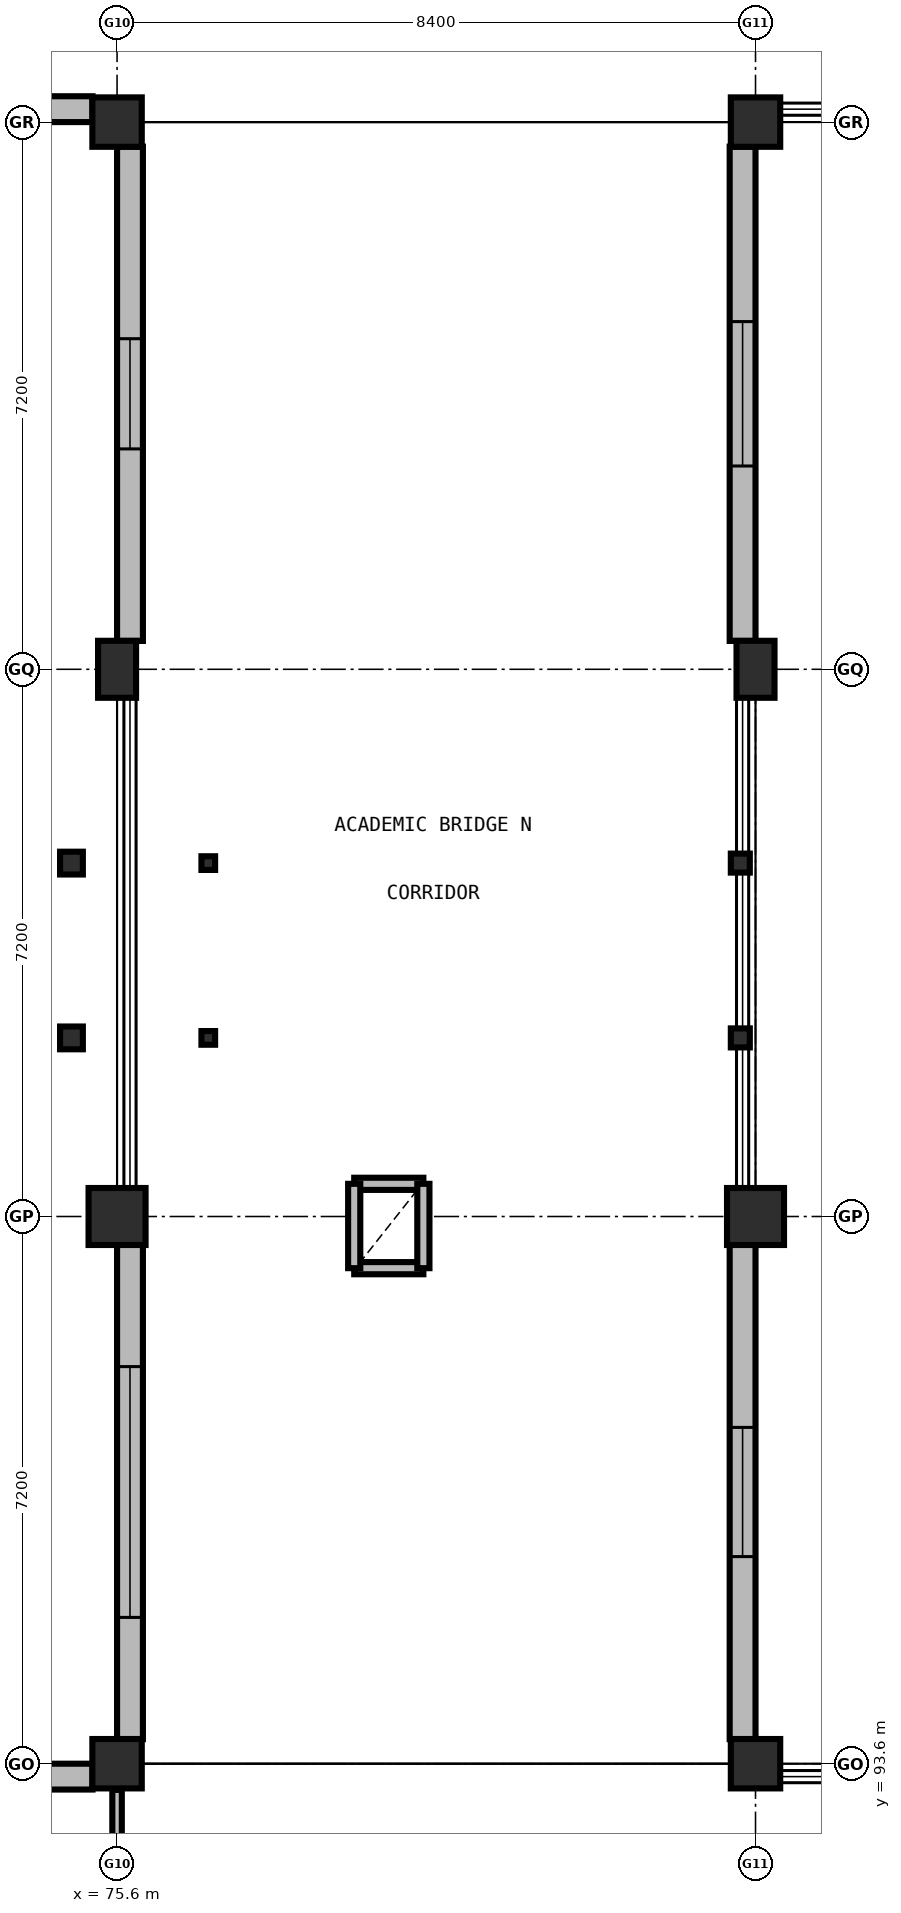
"""IFC4 building model, lengths in metres.
Left out: names, types, materials, properties, quantities, classifications, styles, units other than length and angle.
Written with IfcOpenShell. Run it as: python <this file> out.ifc"""

import sys

from ifc_helpers import new_model, si_unit, direction, frame, frame_2d, origin, origin_2d, place, context, subcontext, project, spatial, rectangle, hollow_rectangle, i_section, extrude, element, fill, save


model = new_model("IFC4")
c1 = context("Model", 3, precision=1e-05, world=origin(), true_north=direction((0.0, 1.0)))
c2 = subcontext(c1, "Body", "Model", "MODEL_VIEW")
j1 = project(units=[si_unit("LENGTHUNIT", "METRE"), si_unit("PLANEANGLEUNIT", "RADIAN")], contexts=[c1])
p1 = place(None, origin())
s1 = spatial("IfcSite", under=j1, at=p1, CompositionType="ELEMENT")
p2 = place(p1, origin())
s2 = spatial("IfcBuilding", under=s1, at=p2, CompositionType="ELEMENT")
p3 = place(p2, frame((0.0, 0.0, 5.1)))
s3 = spatial("IfcBuildingStorey", under=s2, at=p3, CompositionType="ELEMENT", Elevation=5.1)
p4 = place(p3, frame((75.6, 93.6, 0.0), z_axis=(0.0, 0.0, 1.0), x_axis=(1.0, 0.0, 0.0)))
e1 = element("IfcColumn", 1, at=p4, inside=s3, PredefinedType="COLUMN", context=c2, shape_type="SweptSolid", body=[
    extrude(rectangle(XDim=0.65, YDim=0.65, at=origin_2d()), origin(), (0.0, 0.0, 1.0), 4.2),
])
p5 = place(p3, frame((75.6, 100.8, 0.0), z_axis=(0.0, 0.0, 1.0), x_axis=(1.0, 0.0, 0.0)))
e2 = element("IfcColumn", 2, at=p5, inside=s3, PredefinedType="COLUMN", context=c2, shape_type="SweptSolid", body=[
    extrude(rectangle(XDim=0.75, YDim=0.75, at=origin_2d()), origin(), (0.0, 0.0, 1.0), 4.2),
])
p6 = place(p3, frame((75.6, 108.0, 0.0), z_axis=(0.0, 0.0, 1.0), x_axis=(1.0, 0.0, 0.0)))
e3 = element("IfcColumn", 3, at=p6, inside=s3, PredefinedType="COLUMN", context=c2, shape_type="SweptSolid", body=[
    extrude(rectangle(XDim=0.5, YDim=0.75, at=origin_2d()), origin(), (0.0, 0.0, 1.0), 4.2),
])
for number, where, z_axis, x_axis in (
    (4, (75.6, 115.2, 0.0), (0.0, 0.0, 1.0), (1.0, 0.0, 0.0)),
    (5, (84.0, 93.6, 0.0), (0.0, 0.0, 1.0), (1.0, 0.0, 0.0)),
):
    element("IfcColumn", number, at=place(p3, frame(where, z_axis=z_axis, x_axis=x_axis)), inside=s3, PredefinedType="COLUMN", context=c2, shape_type="SweptSolid", body=[
        extrude(rectangle(XDim=0.65, YDim=0.65, at=origin_2d()), origin(), (0.0, 0.0, 1.0), 4.2),
    ])
p7 = place(p3, frame((84.0, 100.8, 0.0), z_axis=(0.0, 0.0, 1.0), x_axis=(1.0, 0.0, 0.0)))
e6 = element("IfcColumn", 6, at=p7, inside=s3, PredefinedType="COLUMN", context=c2, shape_type="SweptSolid", body=[
    extrude(rectangle(XDim=0.75, YDim=0.75, at=origin_2d()), origin(), (0.0, 0.0, 1.0), 4.2),
])
p8 = place(p3, frame((84.0, 108.0, 0.0), z_axis=(0.0, 0.0, 1.0), x_axis=(1.0, 0.0, 0.0)))
e7 = element("IfcColumn", 7, at=p8, inside=s3, PredefinedType="COLUMN", context=c2, shape_type="SweptSolid", body=[
    extrude(rectangle(XDim=0.5, YDim=0.75, at=origin_2d()), origin(), (0.0, 0.0, 1.0), 4.2),
])
p9 = place(p3, frame((84.0, 115.2, 0.0), z_axis=(0.0, 0.0, 1.0), x_axis=(1.0, 0.0, 0.0)))
e8 = element("IfcColumn", 8, at=p9, inside=s3, PredefinedType="COLUMN", context=c2, shape_type="SweptSolid", body=[
    extrude(rectangle(XDim=0.65, YDim=0.65, at=origin_2d()), origin(), (0.0, 0.0, 1.0), 4.2),
])
for number, where, z_axis, x_axis in (
    (9, (75.0, 103.15, 0.0), (0.0, 0.0, 1.0), (1.0, 0.0, 0.0)),
    (10, (75.0, 105.45, 0.0), (0.0, 0.0, 1.0), (1.0, 0.0, 0.0)),
):
    element("IfcColumn", number, at=place(p3, frame(where, z_axis=z_axis, x_axis=x_axis)), inside=s3, PredefinedType="COLUMN", context=c2, shape_type="SweptSolid", body=[
        extrude(i_section(OverallWidth=0.3, OverallDepth=0.3, WebThickness=0.011, FlangeThickness=0.019, FilletRadius=0.027, at=origin_2d()), origin(), (0.0, 0.0, 1.0), 4.2),
    ])
for number, where, z_axis, x_axis in (
    (11, (76.8, 103.15, 0.0), (0.0, 0.0, 1.0), (1.0, 0.0, 0.0)),
    (12, (76.8, 105.45, 0.0), (0.0, 0.0, 1.0), (1.0, 0.0, 0.0)),
):
    element("IfcColumn", number, at=place(p3, frame(where, z_axis=z_axis, x_axis=x_axis)), inside=s3, PredefinedType="COLUMN", context=c2, shape_type="SweptSolid", body=[
        extrude(hollow_rectangle(XDim=0.18, YDim=0.18, WallThickness=0.008, at=origin_2d()), origin(), (0.0, 0.0, 1.0), 4.2),
    ])
for number, where, z_axis, x_axis in (
    (13, (83.8, 103.15, 0.0), (0.0, 0.0, 1.0), (1.0, 0.0, 0.0)),
    (14, (83.8, 105.45, 0.0), (0.0, 0.0, 1.0), (1.0, 0.0, 0.0)),
):
    element("IfcColumn", number, at=place(p3, frame(where, z_axis=z_axis, x_axis=x_axis)), inside=s3, PredefinedType="COLUMN", context=c2, shape_type="SweptSolid", body=[
        extrude(hollow_rectangle(XDim=0.25, YDim=0.25, WallThickness=0.01, at=origin_2d()), origin(), (0.0, 0.0, 1.0), 4.2),
    ])
p10 = place(p3, frame((67.523, 93.43, 0.0), z_axis=(0.0, 0.0, 1.0), x_axis=(1.0, 0.0, 0.0)))
e15 = element("IfcWall", 15, at=p10, inside=s3, PredefinedType="SOLIDWALL", context=c2, shape_type="SweptSolid", body=[
    extrude(rectangle(XDim=7.754, YDim=0.34, at=frame_2d((3.877, 0.0))), origin(), (0.0, 0.0, 1.0), 3.11),
])
p11 = place(p10, frame((2.327, 0.0, 0.95)))
e16 = element("IfcOpeningElement", 16, at=p11, cuts=e15, PredefinedType="OPENING", context=c2, shape_type="SweptSolid", body=[
    extrude(rectangle(XDim=3.1, YDim=1.91, at=frame_2d((1.55, 0.955))), frame((0.0, 0.18, 0.0), z_axis=(0.0, -1.0, 0.0), x_axis=(1.0, 0.0, 0.0)), (0.0, 0.0, 1.0), 0.36),
])
p12 = place(p3, frame((75.77, 93.923, 0.0), z_axis=(0.0, 0.0, 1.0), x_axis=(0.0, 1.0, 0.0)))
e17 = element("IfcWall", 17, at=p12, inside=s3, PredefinedType="SOLIDWALL", context=c2, shape_type="SweptSolid", body=[
    extrude(rectangle(XDim=6.504, YDim=0.34, at=frame_2d((3.252, 0.0))), origin(), (0.0, 0.0, 1.0), 3.86),
])
p13 = place(p12, frame((1.602, 0.0, 0.95)))
e18 = element("IfcOpeningElement", 18, at=p13, cuts=e17, PredefinedType="OPENING", context=c2, shape_type="SweptSolid", body=[
    extrude(rectangle(XDim=3.3, YDim=1.65, at=frame_2d((1.65, 0.825))), frame((0.0, 0.18, 0.0), z_axis=(0.0, -1.0, 0.0), x_axis=(1.0, 0.0, 0.0)), (0.0, 0.0, 1.0), 0.36),
])
p14 = place(p3, frame((75.77, 108.373, 0.0), z_axis=(0.0, 0.0, 1.0), x_axis=(0.0, 1.0, 0.0)))
e19 = element("IfcWall", 19, at=p14, inside=s3, PredefinedType="SOLIDWALL", context=c2, shape_type="SweptSolid", body=[
    extrude(rectangle(XDim=6.504, YDim=0.34, at=frame_2d((3.252, 0.0))), origin(), (0.0, 0.0, 1.0), 3.86),
])
p15 = place(p14, frame((2.527, 0.0, 0.95)))
e20 = element("IfcOpeningElement", 20, at=p15, cuts=e19, PredefinedType="OPENING", context=c2, shape_type="SweptSolid", body=[
    extrude(rectangle(XDim=1.45, YDim=1.85, at=frame_2d((0.725, 0.925))), frame((0.0, 0.18, 0.0), z_axis=(0.0, -1.0, 0.0), x_axis=(1.0, 0.0, 0.0)), (0.0, 0.0, 1.0), 0.36),
])
p16 = place(p3, frame((75.277, 115.37, 0.0), z_axis=(0.0, 0.0, 1.0), x_axis=(-1.0, 0.0, 0.0)))
e21 = element("IfcWall", 21, at=p16, inside=s3, PredefinedType="SOLIDWALL", context=c2, shape_type="SweptSolid", body=[
    extrude(rectangle(XDim=7.754, YDim=0.34, at=frame_2d((3.877, 0.0))), origin(), (0.0, 0.0, 1.0), 3.11),
])
p17 = place(p16, frame((1.751, 0.0, 0.95)))
e22 = element("IfcOpeningElement", 22, at=p17, cuts=e21, PredefinedType="OPENING", context=c2, shape_type="SweptSolid", body=[
    extrude(rectangle(XDim=1.25, YDim=1.5, at=frame_2d((0.625, 0.75))), frame((0.0, 0.18, 0.0), z_axis=(0.0, -1.0, 0.0), x_axis=(1.0, 0.0, 0.0)), (0.0, 0.0, 1.0), 0.36),
])
p18 = place(p16, frame((4.753, 0.0, 0.95)))
e23 = element("IfcOpeningElement", 23, at=p18, cuts=e21, PredefinedType="OPENING", context=c2, shape_type="SweptSolid", body=[
    extrude(rectangle(XDim=1.25, YDim=1.5, at=frame_2d((0.625, 0.75))), frame((0.0, 0.18, 0.0), z_axis=(0.0, -1.0, 0.0), x_axis=(1.0, 0.0, 0.0)), (0.0, 0.0, 1.0), 0.36),
])
p19 = place(p3, frame((83.83, 114.877, 0.0), z_axis=(0.0, 0.0, 1.0), x_axis=(0.0, -1.0, 0.0)))
e24 = element("IfcWall", 24, at=p19, inside=s3, PredefinedType="SOLIDWALL", context=c2, shape_type="SweptSolid", body=[
    extrude(rectangle(XDim=6.504, YDim=0.34, at=frame_2d((3.252, 0.0))), origin(), (0.0, 0.0, 1.0), 3.86),
])
p20 = place(p19, frame((2.302, 0.0, 0.95)))
e25 = element("IfcOpeningElement", 25, at=p20, cuts=e24, PredefinedType="OPENING", context=c2, shape_type="SweptSolid", body=[
    extrude(rectangle(XDim=1.9, YDim=1.75, at=frame_2d((0.95, 0.875))), frame((0.0, 0.18, 0.0), z_axis=(0.0, -1.0, 0.0), x_axis=(1.0, 0.0, 0.0)), (0.0, 0.0, 1.0), 0.36),
])
p21 = place(p3, frame((83.83, 100.427, 0.0), z_axis=(0.0, 0.0, 1.0), x_axis=(0.0, -1.0, 0.0)))
e26 = element("IfcWall", 26, at=p21, inside=s3, PredefinedType="SOLIDWALL", context=c2, shape_type="SweptSolid", body=[
    extrude(rectangle(XDim=6.504, YDim=0.34, at=frame_2d((3.252, 0.0))), origin(), (0.0, 0.0, 1.0), 3.86),
])
p22 = place(p21, frame((2.402, 0.0, 0.95)))
e27 = element("IfcOpeningElement", 27, at=p22, cuts=e26, PredefinedType="OPENING", context=c2, shape_type="SweptSolid", body=[
    extrude(rectangle(XDim=1.7, YDim=1.65, at=frame_2d((0.85, 0.825))), frame((0.0, 0.18, 0.0), z_axis=(0.0, -1.0, 0.0), x_axis=(1.0, 0.0, 0.0)), (0.0, 0.0, 1.0), 0.36),
])
for number, where, z_axis, x_axis in (
    (28, (78.72, 100.12, 0.0), (0.0, 0.0, 1.0), (1.0, 0.0, 0.0)),
    (29, (79.63, 101.23, 0.0), (0.0, 0.0, 1.0), (-1.0, 0.0, 0.0)),
):
    element("IfcWall", number, at=place(p3, frame(where, z_axis=z_axis, x_axis=x_axis)), inside=s3, PredefinedType="PARTITIONING", context=c2, shape_type="SweptSolid", body=[
        extrude(rectangle(XDim=0.91, YDim=0.16, at=frame_2d((0.455, 0.0))), origin(), (0.0, 0.0, 1.0), 3.65),
    ])
for number, where, z_axis, x_axis in (
    (30, (78.72, 101.23, 0.0), (0.0, 0.0, 1.0), (0.0, -1.0, 0.0)),
    (31, (79.63, 100.12, 0.0), (0.0, 0.0, 1.0), (0.0, 1.0, 0.0)),
):
    element("IfcWall", number, at=place(p3, frame(where, z_axis=z_axis, x_axis=x_axis)), inside=s3, PredefinedType="PARTITIONING", context=c2, shape_type="SweptSolid", body=[
        extrude(rectangle(XDim=1.11, YDim=0.16, at=frame_2d((0.555, 0.0))), origin(), (0.0, 0.0, 1.0), 3.65),
    ])
p23 = place(p3, frame((75.6, 89.5, 0.0), z_axis=(0.0, 0.0, 1.0), x_axis=(0.0, 1.0, 0.0)))
e32 = element("IfcWall", 32, at=p23, inside=s3, PredefinedType="PARTITIONING", context=c2, shape_type="SweptSolid", body=[
    extrude(rectangle(XDim=3.755, YDim=0.125, at=frame_2d((1.877, 0.0))), origin(), (0.0, 0.0, 1.0), 3.105),
])
p24 = place(p13, origin())
e33 = element("IfcWindow", 33, at=p24, inside=s3, PartitioningType="SINGLE_PANEL", PredefinedType="WINDOW", context=c2, shape_type="SweptSolid", body=[
    extrude(rectangle(XDim=3.3, YDim=1.65, at=frame_2d((1.65, 0.825))), frame((0.0, 0.03, 0.0), z_axis=(0.0, -1.0, 0.0), x_axis=(1.0, 0.0, 0.0)), (0.0, 0.0, 1.0), 0.06),
])
fill(e18, e33)
p25 = place(p15, origin())
e34 = element("IfcWindow", 34, at=p25, inside=s3, PartitioningType="SINGLE_PANEL", PredefinedType="WINDOW", context=c2, shape_type="SweptSolid", body=[
    extrude(rectangle(XDim=1.45, YDim=1.85, at=frame_2d((0.725, 0.925))), frame((0.0, 0.03, 0.0), z_axis=(0.0, -1.0, 0.0), x_axis=(1.0, 0.0, 0.0)), (0.0, 0.0, 1.0), 0.06),
])
fill(e20, e34)
p26 = place(p20, origin())
e35 = element("IfcWindow", 35, at=p26, inside=s3, PartitioningType="SINGLE_PANEL", PredefinedType="WINDOW", context=c2, shape_type="SweptSolid", body=[
    extrude(rectangle(XDim=1.9, YDim=1.75, at=frame_2d((0.95, 0.875))), frame((0.0, 0.03, 0.0), z_axis=(0.0, -1.0, 0.0), x_axis=(1.0, 0.0, 0.0)), (0.0, 0.0, 1.0), 0.06),
])
fill(e25, e35)
p27 = place(p22, origin())
e36 = element("IfcWindow", 36, at=p27, inside=s3, PartitioningType="SINGLE_PANEL", PredefinedType="WINDOW", context=c2, shape_type="SweptSolid", body=[
    extrude(rectangle(XDim=1.7, YDim=1.65, at=frame_2d((0.85, 0.825))), frame((0.0, 0.03, 0.0), z_axis=(0.0, -1.0, 0.0), x_axis=(1.0, 0.0, 0.0)), (0.0, 0.0, 1.0), 0.06),
])
fill(e27, e36)
save(model, sys.argv[1])
